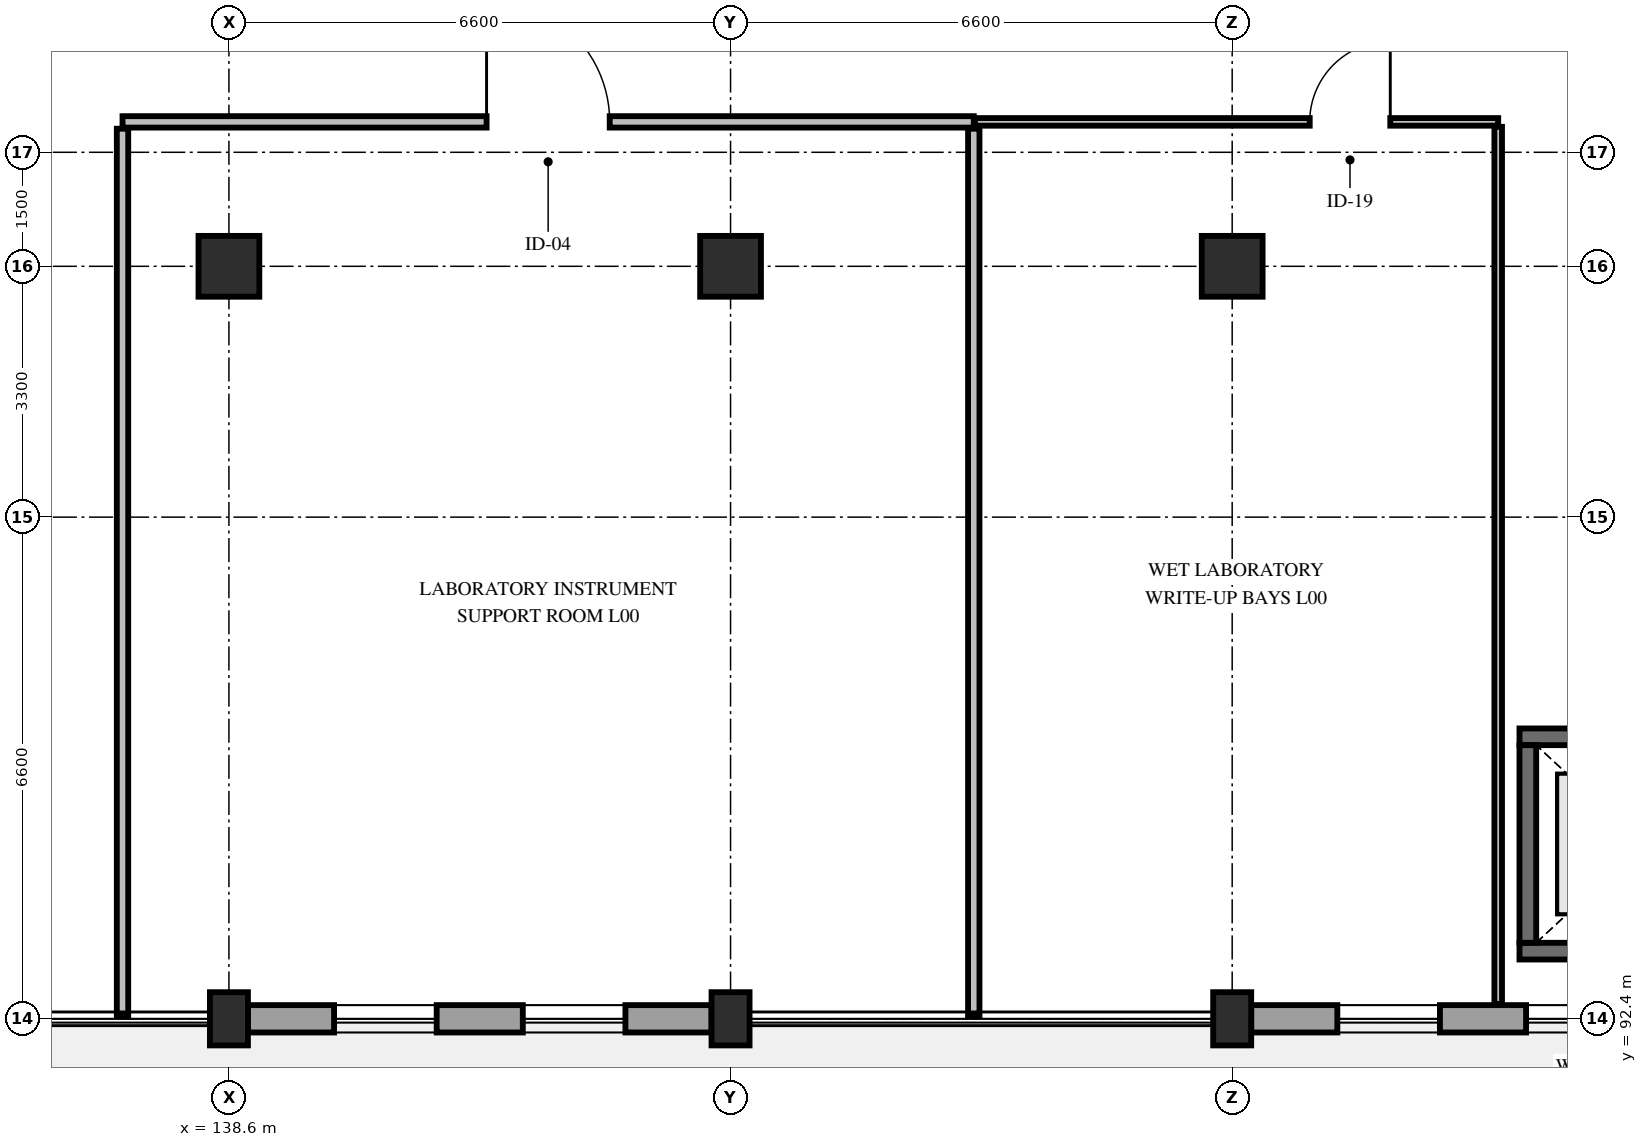
"""IFC4 building model, lengths in metres.
Left out: names, types, materials, properties, quantities, classifications, styles, units other than length and angle.
Written with IfcOpenShell. Run it as: python <this file> out.ifc"""

import sys

from ifc_helpers import new_model, si_unit, direction, frame, frame_2d, origin, origin_2d, place, context, subcontext, project, spatial, rectangle, extrude, element, fill, save


model = new_model("IFC4")
c1 = context("Model", 3, precision=1e-05, world=origin(), true_north=direction((0.0, 1.0)))
c2 = subcontext(c1, "Body", "Model", "MODEL_VIEW")
j1 = project(units=[si_unit("LENGTHUNIT", "METRE"), si_unit("PLANEANGLEUNIT", "RADIAN")], contexts=[c1])
p1 = place(None, origin())
s1 = spatial("IfcSite", under=j1, at=p1, CompositionType="ELEMENT")
p2 = place(p1, origin())
s2 = spatial("IfcBuilding", under=s1, at=p2, CompositionType="ELEMENT")
p3 = place(p2, origin())
s3 = spatial("IfcBuildingStorey", under=s2, at=p3, CompositionType="ELEMENT", Elevation=0.0)
p4 = place(p3, frame((138.6, 92.4, 0.0), z_axis=(0.0, 0.0, 1.0), x_axis=(1.0, 0.0, 0.0)))
e1 = element("IfcColumn", 1, at=p4, inside=s3, PredefinedType="PILASTER", context=c2, shape_type="SweptSolid", body=[
    extrude(rectangle(XDim=0.5, YDim=0.7, at=origin_2d()), origin(), (0.0, 0.0, 1.0), 5.4),
])
p5 = place(p3, frame((138.6, 102.3, 0.0), z_axis=(0.0, 0.0, 1.0), x_axis=(1.0, 0.0, 0.0)))
e2 = element("IfcColumn", 2, at=p5, inside=s3, PredefinedType="COLUMN", context=c2, shape_type="SweptSolid", body=[
    extrude(rectangle(XDim=0.8, YDim=0.8, at=origin_2d()), origin(), (0.0, 0.0, 1.0), 5.4),
])
p6 = place(p3, frame((145.2, 92.4, 0.0), z_axis=(0.0, 0.0, 1.0), x_axis=(1.0, 0.0, 0.0)))
e3 = element("IfcColumn", 3, at=p6, inside=s3, PredefinedType="PILASTER", context=c2, shape_type="SweptSolid", body=[
    extrude(rectangle(XDim=0.5, YDim=0.7, at=origin_2d()), origin(), (0.0, 0.0, 1.0), 5.4),
])
p7 = place(p3, frame((145.2, 102.3, 0.0), z_axis=(0.0, 0.0, 1.0), x_axis=(1.0, 0.0, 0.0)))
e4 = element("IfcColumn", 4, at=p7, inside=s3, PredefinedType="COLUMN", context=c2, shape_type="SweptSolid", body=[
    extrude(rectangle(XDim=0.8, YDim=0.8, at=origin_2d()), origin(), (0.0, 0.0, 1.0), 5.4),
])
p8 = place(p3, frame((151.8, 92.4, 0.0), z_axis=(0.0, 0.0, 1.0), x_axis=(1.0, 0.0, 0.0)))
e5 = element("IfcColumn", 5, at=p8, inside=s3, PredefinedType="PILASTER", context=c2, shape_type="SweptSolid", body=[
    extrude(rectangle(XDim=0.5, YDim=0.7, at=origin_2d()), origin(), (0.0, 0.0, 1.0), 5.4),
])
p9 = place(p3, frame((151.8, 102.3, 0.0), z_axis=(0.0, 0.0, 1.0), x_axis=(1.0, 0.0, 0.0)))
e6 = element("IfcColumn", 6, at=p9, inside=s3, PredefinedType="COLUMN", context=c2, shape_type="SweptSolid", body=[
    extrude(rectangle(XDim=0.8, YDim=0.8, at=origin_2d()), origin(), (0.0, 0.0, 1.0), 5.4),
])
p10 = place(p3, frame((158.15, 92.4, 0.0), z_axis=(0.0, 0.0, 1.0), x_axis=(-1.0, 0.0, 0.0)))
e7 = element("IfcWall", 7, at=p10, inside=s3, PredefinedType="STANDARD", context=c2, shape_type="SweptSolid", body=[
    extrude(rectangle(XDim=6.1, YDim=0.36, at=frame_2d((3.05, 0.0))), origin(), (0.0, 0.0, 1.0), 4.38),
])
p11 = place(p10, frame((1.133, 0.0, 0.85)))
e8 = element("IfcOpeningElement", 8, at=p11, cuts=e7, PredefinedType="OPENING", context=c2, shape_type="SweptSolid", body=[
    extrude(rectangle(XDim=1.35, YDim=2.08, at=frame_2d((0.675, 1.04))), frame((0.0, 0.195, 0.0), z_axis=(0.0, -1.0, 0.0), x_axis=(1.0, 0.0, 0.0)), (0.0, 0.0, 1.0), 0.39),
])
p12 = place(p10, frame((3.617, 0.0, 0.85)))
e9 = element("IfcOpeningElement", 9, at=p12, cuts=e7, PredefinedType="OPENING", context=c2, shape_type="SweptSolid", body=[
    extrude(rectangle(XDim=1.35, YDim=2.08, at=frame_2d((0.675, 1.04))), frame((0.0, 0.195, 0.0), z_axis=(0.0, -1.0, 0.0), x_axis=(1.0, 0.0, 0.0)), (0.0, 0.0, 1.0), 0.39),
])
p13 = place(p3, frame((144.95, 92.4, 0.0), z_axis=(0.0, 0.0, 1.0), x_axis=(-1.0, 0.0, 0.0)))
e10 = element("IfcWall", 10, at=p13, inside=s3, PredefinedType="STANDARD", context=c2, shape_type="SweptSolid", body=[
    extrude(rectangle(XDim=6.1, YDim=0.36, at=frame_2d((3.05, 0.0))), origin(), (0.0, 0.0, 1.0), 3.96),
])
p14 = place(p13, frame((1.133, 0.0, 0.85)))
e11 = element("IfcOpeningElement", 11, at=p14, cuts=e10, PredefinedType="OPENING", context=c2, shape_type="SweptSolid", body=[
    extrude(rectangle(XDim=1.35, YDim=2.08, at=frame_2d((0.675, 1.04))), frame((0.0, 0.195, 0.0), z_axis=(0.0, -1.0, 0.0), x_axis=(1.0, 0.0, 0.0)), (0.0, 0.0, 1.0), 0.39),
])
p15 = place(p13, frame((3.617, 0.0, 0.85)))
e12 = element("IfcOpeningElement", 12, at=p15, cuts=e10, PredefinedType="OPENING", context=c2, shape_type="SweptSolid", body=[
    extrude(rectangle(XDim=1.35, YDim=2.08, at=frame_2d((0.675, 1.04))), frame((0.0, 0.195, 0.0), z_axis=(0.0, -1.0, 0.0), x_axis=(1.0, 0.0, 0.0)), (0.0, 0.0, 1.0), 0.39),
])
p16 = place(p3, frame((155.58, 93.29, 0.0), z_axis=(0.0, 0.0, 1.0), x_axis=(1.0, 0.0, 0.0)))
e13 = element("IfcWall", 13, at=p16, inside=s3, PredefinedType="SHEAR", context=c2, shape_type="SweptSolid", body=[
    extrude(rectangle(XDim=3.24, YDim=0.22, at=frame_2d((1.62, 0.0))), origin(), (0.0, 0.0, 1.0), 5.06),
])
p17 = place(p3, frame((155.58, 96.11, 0.0), z_axis=(0.0, 0.0, 1.0), x_axis=(1.0, 0.0, 0.0)))
e14 = element("IfcWall", 14, at=p17, inside=s3, PredefinedType="SHEAR", context=c2, shape_type="SweptSolid", body=[
    extrude(rectangle(XDim=3.24, YDim=0.22, at=frame_2d((1.62, 0.0))), origin(), (0.0, 0.0, 1.0), 5.06),
])
p18 = place(p17, frame((0.92, 0.0, 0.0)))
e15 = element("IfcOpeningElement", 15, at=p18, cuts=e14, PredefinedType="OPENING", context=c2, shape_type="SweptSolid", body=[
    extrude(rectangle(XDim=1.4, YDim=2.3, at=frame_2d((0.7, 1.15))), frame((0.0, 0.125, 0.0), z_axis=(0.0, -1.0, 0.0), x_axis=(1.0, 0.0, 0.0)), (0.0, 0.0, 1.0), 0.25),
])
p19 = place(p3, frame((155.69, 93.4, 0.0), z_axis=(0.0, 0.0, 1.0), x_axis=(0.0, 1.0, 0.0)))
e16 = element("IfcWall", 16, at=p19, inside=s3, PredefinedType="SHEAR", context=c2, shape_type="SweptSolid", body=[
    extrude(rectangle(XDim=2.6, YDim=0.22, at=frame_2d((1.3, 0.0))), origin(), (0.0, 0.0, 1.0), 5.06),
])
p20 = place(p3, frame((137.2, 104.2, 0.0), z_axis=(0.0, 0.0, 1.0), x_axis=(1.0, 0.0, 0.0)))
e17 = element("IfcWall", 17, at=p20, inside=s3, PredefinedType="PARTITIONING", context=c2, shape_type="SweptSolid", body=[
    extrude(rectangle(XDim=11.2, YDim=0.15, at=frame_2d((5.6, 0.0))), origin(), (0.0, 0.0, 1.0), 4.38),
])
p21 = place(p20, frame((4.79, 0.0, 0.0)))
e18 = element("IfcOpeningElement", 18, at=p21, cuts=e17, PredefinedType="OPENING", context=c2, shape_type="SweptSolid", body=[
    extrude(rectangle(XDim=1.62, YDim=2.3, at=frame_2d((0.81, 1.15))), frame((0.0, 0.09, 0.0), z_axis=(0.0, -1.0, 0.0), x_axis=(1.0, 0.0, 0.0)), (0.0, 0.0, 1.0), 0.18),
])
for number, where, z_axis, x_axis in (
    (19, (137.2, 92.44, 0.0), (0.0, 0.0, 1.0), (0.0, 1.0, 0.0)),
    (20, (148.4, 92.44, 0.0), (0.0, 0.0, 1.0), (0.0, 1.0, 0.0)),
):
    element("IfcWall", number, at=place(p3, frame(where, z_axis=z_axis, x_axis=x_axis)), inside=s3, PredefinedType="PARTITIONING", context=c2, shape_type="SweptSolid", body=[
        extrude(rectangle(XDim=11.67, YDim=0.15, at=frame_2d((5.835, 0.0))), origin(), (0.0, 0.0, 1.0), 4.53),
    ])
p22 = place(p3, frame((148.415, 104.2, 0.0), z_axis=(0.0, 0.0, 1.0), x_axis=(1.0, 0.0, 0.0)))
e21 = element("IfcWall", 21, at=p22, inside=s3, PredefinedType="PARTITIONING", context=c2, shape_type="SweptSolid", body=[
    extrude(rectangle(XDim=6.885, YDim=0.1, at=frame_2d((3.442, 0.0))), origin(), (0.0, 0.0, 1.0), 4.38),
])
p23 = place(p22, frame((4.405, 0.0, 0.0)))
e22 = element("IfcOpeningElement", 22, at=p23, cuts=e21, PredefinedType="OPENING", context=c2, shape_type="SweptSolid", body=[
    extrude(rectangle(XDim=1.06, YDim=2.2, at=frame_2d((0.53, 1.1))), frame((0.0, 0.065, 0.0), z_axis=(0.0, -1.0, 0.0), x_axis=(1.0, 0.0, 0.0)), (0.0, 0.0, 1.0), 0.13),
])
p24 = place(p3, frame((155.3, 92.595, 0.0), z_axis=(0.0, 0.0, 1.0), x_axis=(0.0, 1.0, 0.0)))
e23 = element("IfcWall", 23, at=p24, inside=s3, PredefinedType="PARTITIONING", context=c2, shape_type="SweptSolid", body=[
    extrude(rectangle(XDim=11.54, YDim=0.1, at=frame_2d((5.77, 0.0))), origin(), (0.0, 0.0, 1.0), 4.53),
])
p25 = place(p11, origin())
e24 = element("IfcWindow", 24, at=p25, inside=s3, PartitioningType="SINGLE_PANEL", PredefinedType="WINDOW", context=c2, shape_type="SweptSolid", body=[
    extrude(rectangle(XDim=1.35, YDim=2.08, at=frame_2d((0.675, 1.04))), frame((0.0, 0.03, 0.0), z_axis=(0.0, -1.0, 0.0), x_axis=(1.0, 0.0, 0.0)), (0.0, 0.0, 1.0), 0.06),
])
fill(e8, e24)
p26 = place(p12, origin())
e25 = element("IfcWindow", 25, at=p26, inside=s3, PartitioningType="SINGLE_PANEL", PredefinedType="WINDOW", context=c2, shape_type="SweptSolid", body=[
    extrude(rectangle(XDim=1.35, YDim=2.08, at=frame_2d((0.675, 1.04))), frame((0.0, 0.03, 0.0), z_axis=(0.0, -1.0, 0.0), x_axis=(1.0, 0.0, 0.0)), (0.0, 0.0, 1.0), 0.06),
])
fill(e9, e25)
p27 = place(p14, origin())
e26 = element("IfcWindow", 26, at=p27, inside=s3, PartitioningType="SINGLE_PANEL", PredefinedType="WINDOW", context=c2, shape_type="SweptSolid", body=[
    extrude(rectangle(XDim=1.35, YDim=2.08, at=frame_2d((0.675, 1.04))), frame((0.0, 0.03, 0.0), z_axis=(0.0, -1.0, 0.0), x_axis=(1.0, 0.0, 0.0)), (0.0, 0.0, 1.0), 0.06),
])
fill(e11, e26)
p28 = place(p15, origin())
e27 = element("IfcWindow", 27, at=p28, inside=s3, PartitioningType="SINGLE_PANEL", PredefinedType="WINDOW", context=c2, shape_type="SweptSolid", body=[
    extrude(rectangle(XDim=1.35, YDim=2.08, at=frame_2d((0.675, 1.04))), frame((0.0, 0.03, 0.0), z_axis=(0.0, -1.0, 0.0), x_axis=(1.0, 0.0, 0.0)), (0.0, 0.0, 1.0), 0.06),
])
fill(e12, e27)
p29 = place(p21, origin())
e28 = element("IfcDoor", 28, at=p29, inside=s3, OperationType="SINGLE_SWING_LEFT", PredefinedType="DOOR", context=c2, shape_type="SweptSolid", body=[
    extrude(rectangle(XDim=1.62, YDim=2.3, at=frame_2d((0.81, 1.15))), frame((0.0, 0.025, 0.0), z_axis=(0.0, -1.0, 0.0), x_axis=(1.0, 0.0, 0.0)), (0.0, 0.0, 1.0), 0.05),
])
fill(e18, e28)
p30 = place(p23, origin())
e29 = element("IfcDoor", 29, at=p30, inside=s3, OperationType="SINGLE_SWING_RIGHT", PredefinedType="DOOR", context=c2, shape_type="SweptSolid", body=[
    extrude(rectangle(XDim=1.06, YDim=2.2, at=frame_2d((0.53, 1.1))), frame((0.0, 0.025, 0.0), z_axis=(0.0, -1.0, 0.0), x_axis=(1.0, 0.0, 0.0)), (0.0, 0.0, 1.0), 0.05),
])
fill(e22, e29)
save(model, sys.argv[1])
